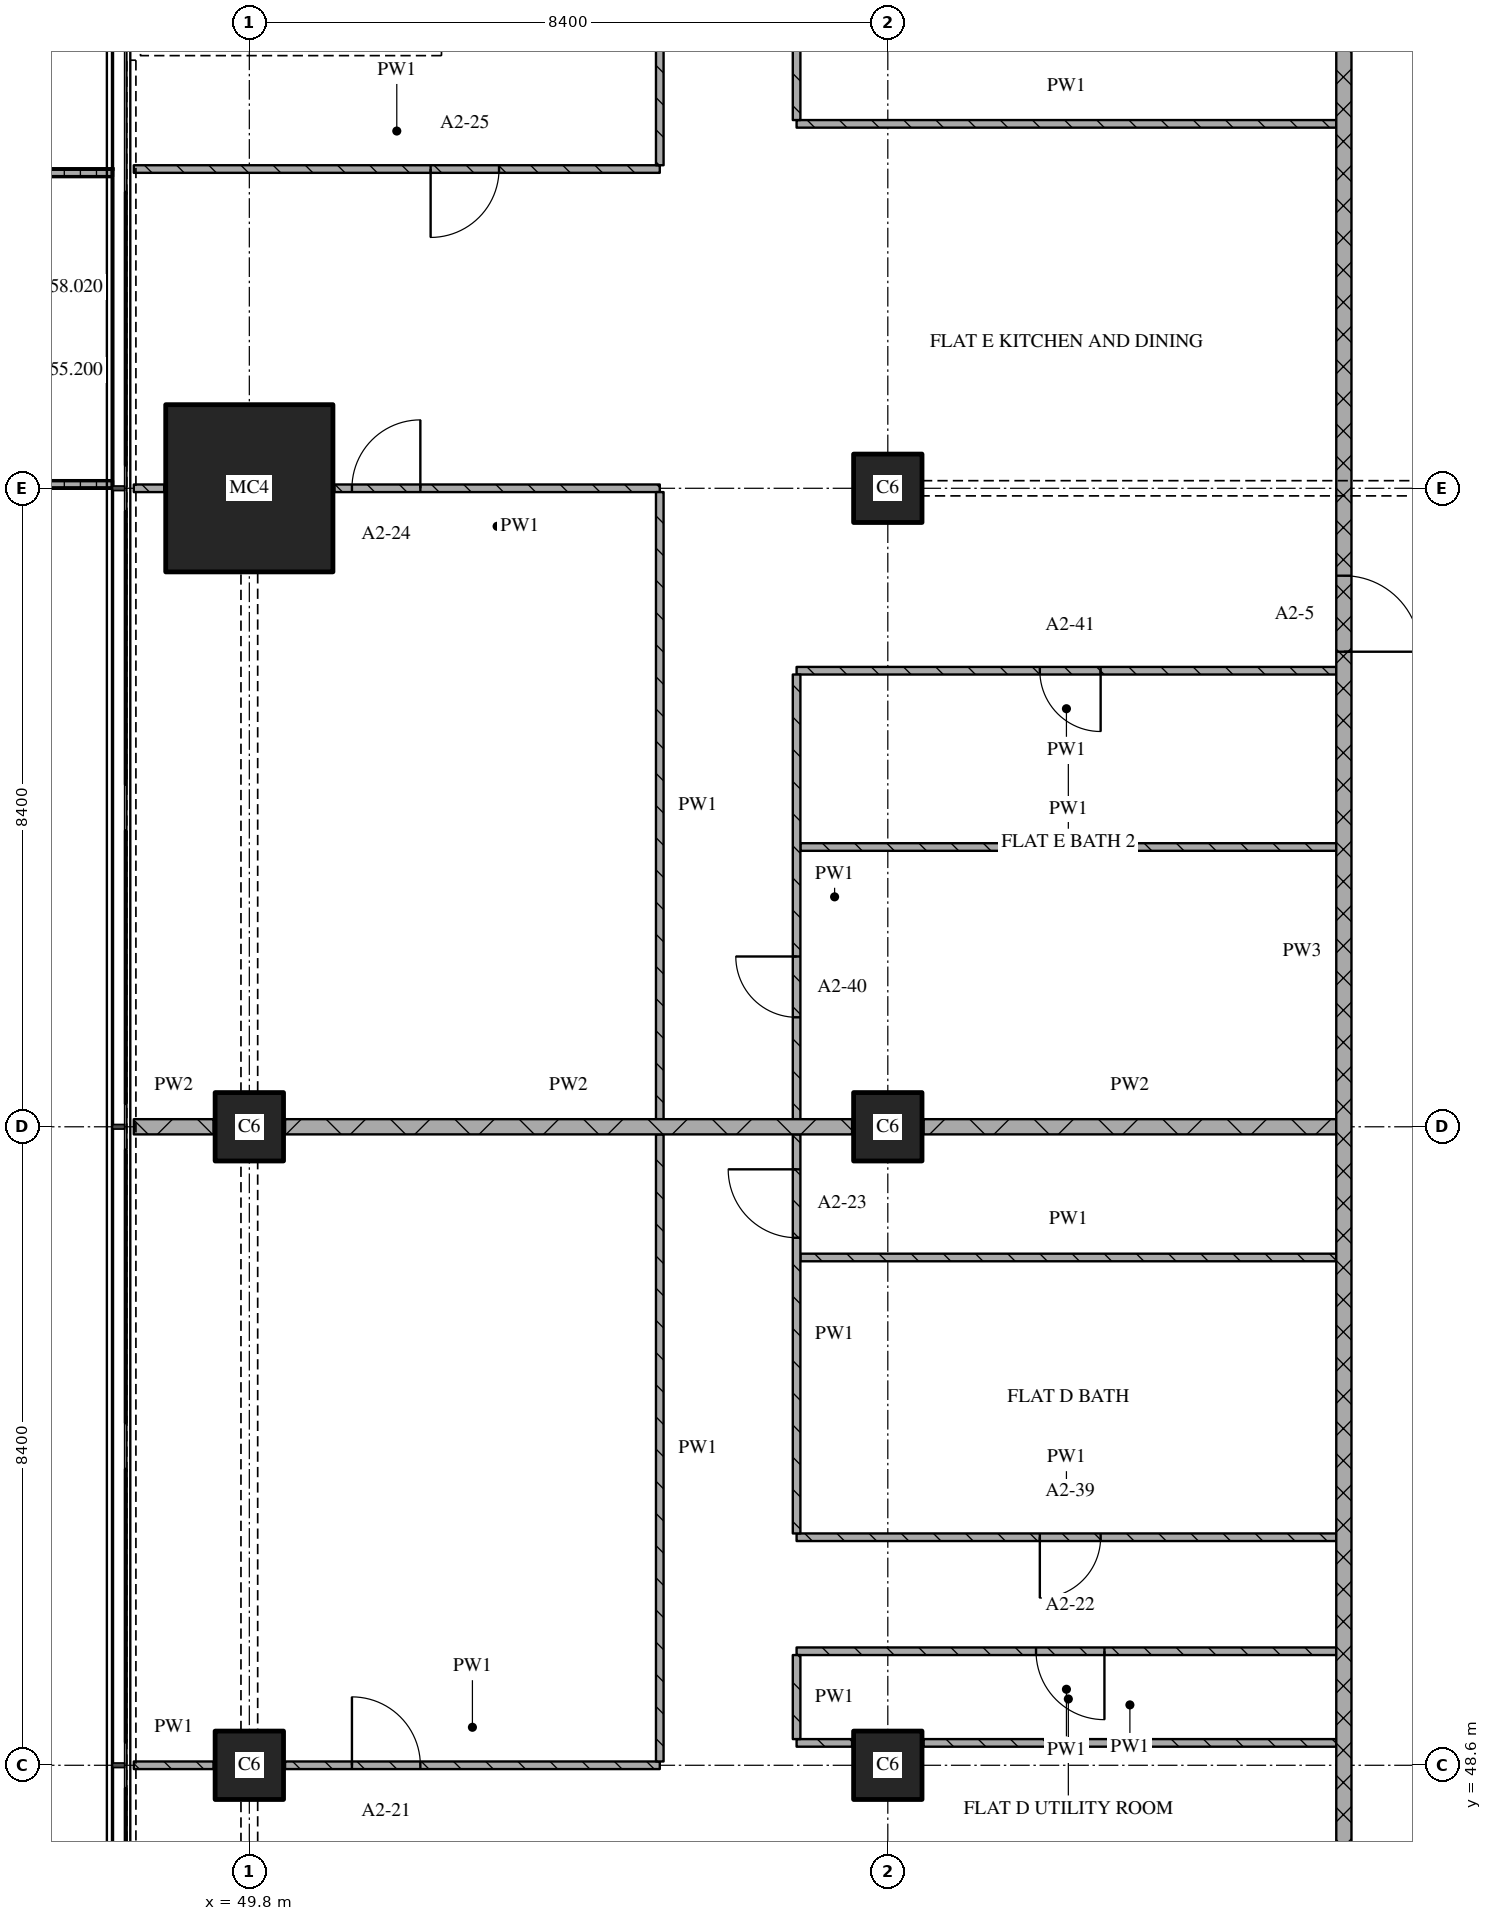
"""IFC4 building model, lengths in metres.
Left out: names, types, materials, properties, quantities, classifications, styles, units other than length and angle.
Written with IfcOpenShell. Run it as: python <this file> out.ifc"""

import sys

from ifc_helpers import new_model, si_unit, direction, frame, frame_2d, origin, origin_2d, place, context, subcontext, project, spatial, polyline, rectangle, outline, extrude, element, fill, save


model = new_model("IFC4")
c1 = context("Model", 3, precision=1e-05, world=origin(), true_north=direction((0.0, 1.0)))
c2 = subcontext(c1, "Body", "Model", "MODEL_VIEW")
j1 = project(units=[si_unit("LENGTHUNIT", "METRE"), si_unit("PLANEANGLEUNIT", "RADIAN")], contexts=[c1])
p1 = place(None, origin())
s1 = spatial("IfcSite", under=j1, at=p1, CompositionType="ELEMENT")
p2 = place(p1, origin())
s2 = spatial("IfcBuilding", under=s1, at=p2, CompositionType="ELEMENT")
p3 = place(p2, frame((0.0, 0.0, 55.2)))
s3 = spatial("IfcBuildingStorey", under=s2, at=p3, CompositionType="ELEMENT", Elevation=55.2)
for number, where, z_axis, x_axis in (
    (1, (49.8, 48.6, 0.0), (0.0, 0.0, 1.0), (1.0, 0.0, 0.0)),
    (2, (49.8, 57.0, 0.0), (0.0, 0.0, 1.0), (1.0, 0.0, 0.0)),
):
    element("IfcColumn", number, at=place(p3, frame(where, z_axis=z_axis, x_axis=x_axis)), inside=s3, PredefinedType="COLUMN", context=c2, shape_type="SweptSolid", body=[
        extrude(rectangle(XDim=0.9, YDim=0.9, at=origin_2d()), origin(), (0.0, 0.0, 1.0), 3.6),
    ])
p4 = place(p3, frame((49.8, 65.4, 0.0), z_axis=(0.0, 0.0, 1.0), x_axis=(1.0, 0.0, 0.0)))
e3 = element("IfcColumn", 3, at=p4, inside=s3, PredefinedType="COLUMN", context=c2, shape_type="SweptSolid", body=[
    extrude(rectangle(XDim=2.2, YDim=2.2, at=origin_2d()), origin(), (0.0, 0.0, 1.0), 3.6),
])
for number, where, z_axis, x_axis in (
    (4, (58.2, 48.6, 0.0), (0.0, 0.0, 1.0), (1.0, 0.0, 0.0)),
    (5, (58.2, 57.0, 0.0), (0.0, 0.0, 1.0), (1.0, 0.0, 0.0)),
    (6, (58.2, 65.4, 0.0), (0.0, 0.0, 1.0), (1.0, 0.0, 0.0)),
):
    element("IfcColumn", number, at=place(p3, frame(where, z_axis=z_axis, x_axis=x_axis)), inside=s3, PredefinedType="COLUMN", context=c2, shape_type="SweptSolid", body=[
        extrude(rectangle(XDim=0.9, YDim=0.9, at=origin_2d()), origin(), (0.0, 0.0, 1.0), 3.6),
    ])
p5 = place(p3, origin())
e7 = element("IfcWall", 7, at=p5, inside=s3, PredefinedType="SOLIDWALL", context=c2, shape_type="SweptSolid", body=[
    extrude(outline(polyline([(48.0, 69.6), (48.0, 69.5), (46.367, 69.5), (46.367, 65.5), (48.0, 65.5), (48.0, 65.4), (46.267, 65.4), (46.267, 69.6), (48.0, 69.6)])), origin(), (0.0, 0.0, 1.0), 1.0),
])
p6 = place(p3, frame((48.28, 48.6, 0.0), z_axis=(0.0, 0.0, 1.0), x_axis=(1.0, 0.0, 0.0)))
e8 = element("IfcWall", 8, at=p6, inside=s3, PredefinedType="PARTITIONING", context=c2, shape_type="SweptSolid", body=[
    extrude(rectangle(XDim=1.05, YDim=0.1, at=frame_2d((0.525, 0.0))), origin(), (0.0, 0.0, 1.0), 3.32),
])
p7 = place(p3, frame((50.27, 48.6, 0.0), z_axis=(0.0, 0.0, 1.0), x_axis=(1.0, 0.0, 0.0)))
e9 = element("IfcWall", 9, at=p7, inside=s3, PredefinedType="PARTITIONING", context=c2, shape_type="SweptSolid", body=[
    extrude(rectangle(XDim=4.93, YDim=0.1, at=frame_2d((2.465, 0.0))), origin(), (0.0, 0.0, 1.0), 3.32),
])
p8 = place(p7, frame((0.88, 0.0, 0.0)))
e10 = element("IfcOpeningElement", 10, at=p8, cuts=e9, PredefinedType="OPENING", context=c2, shape_type="SweptSolid", body=[
    extrude(rectangle(XDim=0.9, YDim=2.1, at=frame_2d((0.45, 1.05))), frame((0.0, 0.06, 0.0), z_axis=(0.0, -1.0, 0.0), x_axis=(1.0, 0.0, 0.0)), (0.0, 0.0, 1.0), 0.12),
])
p9 = place(p3, frame((57.0, 48.894, 0.0), z_axis=(0.0, 0.0, 1.0), x_axis=(1.0, 0.0, 0.0)))
e11 = element("IfcWall", 11, at=p9, inside=s3, PredefinedType="PARTITIONING", context=c2, shape_type="SweptSolid", body=[
    extrude(rectangle(XDim=0.73, YDim=0.1, at=frame_2d((0.365, 0.0))), origin(), (0.0, 0.0, 1.0), 3.32),
])
p10 = place(p3, frame((58.67, 48.894, 0.0), z_axis=(0.0, 0.0, 1.0), x_axis=(1.0, 0.0, 0.0)))
e12 = element("IfcWall", 12, at=p10, inside=s3, PredefinedType="PARTITIONING", context=c2, shape_type="SweptSolid", body=[
    extrude(rectangle(XDim=5.43, YDim=0.1, at=frame_2d((2.715, 0.0))), origin(), (0.0, 0.0, 1.0), 3.32),
])
p11 = place(p3, frame((64.1, 50.1, 0.0), z_axis=(0.0, 0.0, 1.0), x_axis=(-1.0, 0.0, 0.0)))
e13 = element("IfcWall", 13, at=p11, inside=s3, PredefinedType="PARTITIONING", context=c2, shape_type="SweptSolid", body=[
    extrude(rectangle(XDim=7.1, YDim=0.1, at=frame_2d((3.55, 0.0))), origin(), (0.0, 0.0, 1.0), 3.32),
])
p12 = place(p11, frame((3.05, 0.0, 0.0)))
e14 = element("IfcOpeningElement", 14, at=p12, cuts=e13, PredefinedType="OPENING", context=c2, shape_type="SweptSolid", body=[
    extrude(rectangle(XDim=0.9, YDim=2.1, at=frame_2d((0.45, 1.05))), frame((0.0, 0.06, 0.0), z_axis=(0.0, -1.0, 0.0), x_axis=(1.0, 0.0, 0.0)), (0.0, 0.0, 1.0), 0.12),
])
p13 = place(p3, frame((57.0, 51.6, 0.0), z_axis=(0.0, 0.0, 1.0), x_axis=(1.0, 0.0, 0.0)))
e15 = element("IfcWall", 15, at=p13, inside=s3, PredefinedType="PARTITIONING", context=c2, shape_type="SweptSolid", body=[
    extrude(rectangle(XDim=7.1, YDim=0.1, at=frame_2d((3.55, 0.0))), origin(), (0.0, 0.0, 1.0), 3.32),
])
p14 = place(p13, frame((3.2, 0.0, 0.0)))
e16 = element("IfcOpeningElement", 16, at=p14, cuts=e15, PredefinedType="OPENING", context=c2, shape_type="SweptSolid", body=[
    extrude(rectangle(XDim=0.8, YDim=2.1, at=frame_2d((0.4, 1.05))), frame((0.0, 0.06, 0.0), z_axis=(0.0, -1.0, 0.0), x_axis=(1.0, 0.0, 0.0)), (0.0, 0.0, 1.0), 0.12),
])
p15 = place(p3, frame((57.05, 55.281, 0.0), z_axis=(0.0, 0.0, 1.0), x_axis=(1.0, 0.0, 0.0)))
e17 = element("IfcWall", 17, at=p15, inside=s3, PredefinedType="PARTITIONING", context=c2, shape_type="SweptSolid", body=[
    extrude(rectangle(XDim=7.05, YDim=0.1, at=frame_2d((3.525, 0.0))), origin(), (0.0, 0.0, 1.0), 3.32),
])
p16 = place(p3, frame((48.28, 57.0, 0.0), z_axis=(0.0, 0.0, 1.0), x_axis=(1.0, 0.0, 0.0)))
e18 = element("IfcWall", 18, at=p16, inside=s3, PredefinedType="PARTITIONING", context=c2, shape_type="SweptSolid", body=[
    extrude(rectangle(XDim=1.05, YDim=0.2, at=frame_2d((0.525, 0.0))), origin(), (0.0, 0.0, 1.0), 3.32),
])
p17 = place(p3, frame((50.27, 57.0, 0.0), z_axis=(0.0, 0.0, 1.0), x_axis=(1.0, 0.0, 0.0)))
e19 = element("IfcWall", 19, at=p17, inside=s3, PredefinedType="PARTITIONING", context=c2, shape_type="SweptSolid", body=[
    extrude(rectangle(XDim=7.46, YDim=0.2, at=frame_2d((3.73, 0.0))), origin(), (0.0, 0.0, 1.0), 3.32),
])
p18 = place(p3, frame((58.67, 57.0, 0.0), z_axis=(0.0, 0.0, 1.0), x_axis=(1.0, 0.0, 0.0)))
e20 = element("IfcWall", 20, at=p18, inside=s3, PredefinedType="PARTITIONING", context=c2, shape_type="SweptSolid", body=[
    extrude(rectangle(XDim=5.43, YDim=0.2, at=frame_2d((2.715, 0.0))), origin(), (0.0, 0.0, 1.0), 3.32),
])
p19 = place(p3, frame((57.05, 60.681, 0.0), z_axis=(0.0, 0.0, 1.0), x_axis=(1.0, 0.0, 0.0)))
e21 = element("IfcWall", 21, at=p19, inside=s3, PredefinedType="PARTITIONING", context=c2, shape_type="SweptSolid", body=[
    extrude(rectangle(XDim=7.05, YDim=0.1, at=frame_2d((3.525, 0.0))), origin(), (0.0, 0.0, 1.0), 3.32),
])
p20 = place(p3, frame((64.1, 63.0, 0.0), z_axis=(0.0, 0.0, 1.0), x_axis=(-1.0, 0.0, 0.0)))
e22 = element("IfcWall", 22, at=p20, inside=s3, PredefinedType="PARTITIONING", context=c2, shape_type="SweptSolid", body=[
    extrude(rectangle(XDim=7.1, YDim=0.1, at=frame_2d((3.55, 0.0))), origin(), (0.0, 0.0, 1.0), 3.32),
])
p21 = place(p20, frame((3.1, 0.0, 0.0)))
e23 = element("IfcOpeningElement", 23, at=p21, cuts=e22, PredefinedType="OPENING", context=c2, shape_type="SweptSolid", body=[
    extrude(rectangle(XDim=0.8, YDim=2.1, at=frame_2d((0.4, 1.05))), frame((0.0, 0.06, 0.0), z_axis=(0.0, -1.0, 0.0), x_axis=(1.0, 0.0, 0.0)), (0.0, 0.0, 1.0), 0.12),
])
p22 = place(p3, frame((48.28, 65.4, 0.0), z_axis=(0.0, 0.0, 1.0), x_axis=(1.0, 0.0, 0.0)))
e24 = element("IfcWall", 24, at=p22, inside=s3, PredefinedType="PARTITIONING", context=c2, shape_type="SweptSolid", body=[
    extrude(rectangle(XDim=0.4, YDim=0.1, at=frame_2d((0.2, 0.0))), origin(), (0.0, 0.0, 1.0), 3.32),
])
p23 = place(p3, frame((55.2, 65.4, 0.0), z_axis=(0.0, 0.0, 1.0), x_axis=(-1.0, 0.0, 0.0)))
e25 = element("IfcWall", 25, at=p23, inside=s3, PredefinedType="PARTITIONING", context=c2, shape_type="SweptSolid", body=[
    extrude(rectangle(XDim=4.28, YDim=0.1, at=frame_2d((2.14, 0.0))), origin(), (0.0, 0.0, 1.0), 3.32),
])
p24 = place(p23, frame((3.15, 0.0, 0.0)))
e26 = element("IfcOpeningElement", 26, at=p24, cuts=e25, PredefinedType="OPENING", context=c2, shape_type="SweptSolid", body=[
    extrude(rectangle(XDim=0.9, YDim=2.1, at=frame_2d((0.45, 1.05))), frame((0.0, 0.06, 0.0), z_axis=(0.0, -1.0, 0.0), x_axis=(1.0, 0.0, 0.0)), (0.0, 0.0, 1.0), 0.12),
])
p25 = place(p3, frame((48.28, 69.6, 0.0), z_axis=(0.0, 0.0, 1.0), x_axis=(1.0, 0.0, 0.0)))
e27 = element("IfcWall", 27, at=p25, inside=s3, PredefinedType="PARTITIONING", context=c2, shape_type="SweptSolid", body=[
    extrude(rectangle(XDim=6.92, YDim=0.1, at=frame_2d((3.46, 0.0))), origin(), (0.0, 0.0, 1.0), 3.32),
])
p26 = place(p25, frame((3.905, 0.0, 0.0)))
e28 = element("IfcOpeningElement", 28, at=p26, cuts=e27, PredefinedType="OPENING", context=c2, shape_type="SweptSolid", body=[
    extrude(rectangle(XDim=0.9, YDim=2.1, at=frame_2d((0.45, 1.05))), frame((0.0, 0.06, 0.0), z_axis=(0.0, -1.0, 0.0), x_axis=(1.0, 0.0, 0.0)), (0.0, 0.0, 1.0), 0.12),
])
p27 = place(p3, frame((57.0, 70.194, 0.0), z_axis=(0.0, 0.0, 1.0), x_axis=(1.0, 0.0, 0.0)))
e29 = element("IfcWall", 29, at=p27, inside=s3, PredefinedType="PARTITIONING", context=c2, shape_type="SweptSolid", body=[
    extrude(rectangle(XDim=7.1, YDim=0.1, at=frame_2d((3.55, 0.0))), origin(), (0.0, 0.0, 1.0), 3.32),
])
p28 = place(p3, frame((55.2, 75.32, 0.0), z_axis=(0.0, 0.0, 1.0), x_axis=(0.0, -1.0, 0.0)))
e30 = element("IfcWall", 30, at=p28, inside=s3, PredefinedType="PARTITIONING", context=c2, shape_type="SweptSolid", body=[
    extrude(rectangle(XDim=5.67, YDim=0.1, at=frame_2d((2.835, 0.0))), origin(), (0.0, 0.0, 1.0), 3.32),
])
p29 = place(p3, frame((57.0, 50.05, 0.0), z_axis=(0.0, 0.0, 1.0), x_axis=(0.0, -1.0, 0.0)))
e31 = element("IfcWall", 31, at=p29, inside=s3, PredefinedType="PARTITIONING", context=c2, shape_type="SweptSolid", body=[
    extrude(rectangle(XDim=1.106, YDim=0.1, at=frame_2d((0.553, 0.0))), origin(), (0.0, 0.0, 1.0), 3.32),
])
p30 = place(p3, frame((57.0, 75.32, 0.0), z_axis=(0.0, 0.0, 1.0), x_axis=(0.0, -1.0, 0.0)))
e32 = element("IfcWall", 32, at=p30, inside=s3, PredefinedType="PARTITIONING", context=c2, shape_type="SweptSolid", body=[
    extrude(rectangle(XDim=5.076, YDim=0.1, at=frame_2d((2.538, 0.0))), origin(), (0.0, 0.0, 1.0), 3.32),
])
p31 = place(p30, frame((2.723, 0.0, 0.0)))
e33 = element("IfcOpeningElement", 33, at=p31, cuts=e32, PredefinedType="OPENING", context=c2, shape_type="SweptSolid", body=[
    extrude(rectangle(XDim=0.9, YDim=2.1, at=frame_2d((0.45, 1.05))), frame((0.0, 0.06, 0.0), z_axis=(0.0, -1.0, 0.0), x_axis=(1.0, 0.0, 0.0)), (0.0, 0.0, 1.0), 0.12),
])
p32 = place(p3, frame((64.2, 43.3, 0.0), z_axis=(0.0, 0.0, 1.0), x_axis=(0.0, 1.0, 0.0)))
e34 = element("IfcWall", 34, at=p32, inside=s3, PredefinedType="PARTITIONING", context=c2, shape_type="SweptSolid", body=[
    extrude(rectangle(XDim=32.02, YDim=0.2, at=frame_2d((16.01, 0.0))), origin(), (0.0, 0.0, 1.0), 3.32),
])
p33 = place(p32, frame((19.95, 0.0, 0.0)))
e35 = element("IfcOpeningElement", 35, at=p33, cuts=e34, PredefinedType="OPENING", context=c2, shape_type="SweptSolid", body=[
    extrude(rectangle(XDim=1.0, YDim=2.1, at=frame_2d((0.5, 1.05))), frame((0.0, 0.11, 0.0), z_axis=(0.0, -1.0, 0.0), x_axis=(1.0, 0.0, 0.0)), (0.0, 0.0, 1.0), 0.22),
])
for number, where, z_axis, x_axis in (
    (36, (55.2, 56.9, 0.0), (0.0, 0.0, 1.0), (0.0, -1.0, 0.0)),
    (37, (55.2, 65.35, 0.0), (0.0, 0.0, 1.0), (0.0, -1.0, 0.0)),
):
    element("IfcWall", number, at=place(p3, frame(where, z_axis=z_axis, x_axis=x_axis)), inside=s3, PredefinedType="PARTITIONING", context=c2, shape_type="SweptSolid", body=[
        extrude(rectangle(XDim=8.25, YDim=0.1, at=frame_2d((4.125, 0.0))), origin(), (0.0, 0.0, 1.0), 3.32),
    ])
p34 = place(p3, frame((57.0, 56.9, 0.0), z_axis=(0.0, 0.0, 1.0), x_axis=(0.0, -1.0, 0.0)))
e38 = element("IfcWall", 38, at=p34, inside=s3, PredefinedType="PARTITIONING", context=c2, shape_type="SweptSolid", body=[
    extrude(rectangle(XDim=5.25, YDim=0.1, at=frame_2d((2.625, 0.0))), origin(), (0.0, 0.0, 1.0), 3.32),
])
p35 = place(p34, frame((0.46, 0.0, 0.0)))
e39 = element("IfcOpeningElement", 39, at=p35, cuts=e38, PredefinedType="OPENING", context=c2, shape_type="SweptSolid", body=[
    extrude(rectangle(XDim=0.9, YDim=2.1, at=frame_2d((0.45, 1.05))), frame((0.0, 0.06, 0.0), z_axis=(0.0, -1.0, 0.0), x_axis=(1.0, 0.0, 0.0)), (0.0, 0.0, 1.0), 0.12),
])
p36 = place(p3, frame((57.0, 62.95, 0.0), z_axis=(0.0, 0.0, 1.0), x_axis=(0.0, -1.0, 0.0)))
e40 = element("IfcWall", 40, at=p36, inside=s3, PredefinedType="PARTITIONING", context=c2, shape_type="SweptSolid", body=[
    extrude(rectangle(XDim=5.85, YDim=0.1, at=frame_2d((2.925, 0.0))), origin(), (0.0, 0.0, 1.0), 3.32),
])
p37 = place(p36, frame((3.71, 0.0, 0.0)))
e41 = element("IfcOpeningElement", 41, at=p37, cuts=e40, PredefinedType="OPENING", context=c2, shape_type="SweptSolid", body=[
    extrude(rectangle(XDim=0.8, YDim=2.1, at=frame_2d((0.4, 1.05))), frame((0.0, 0.06, 0.0), z_axis=(0.0, -1.0, 0.0), x_axis=(1.0, 0.0, 0.0)), (0.0, 0.0, 1.0), 0.12),
])
p38 = place(p8, origin())
e42 = element("IfcDoor", 42, at=p38, inside=s3, OperationType="SINGLE_SWING_LEFT", PredefinedType="DOOR", context=c2, shape_type="SweptSolid", body=[
    extrude(rectangle(XDim=0.9, YDim=2.1, at=frame_2d((0.45, 1.05))), frame((0.0, 0.025, 0.0), z_axis=(0.0, -1.0, 0.0), x_axis=(1.0, 0.0, 0.0)), (0.0, 0.0, 1.0), 0.05),
])
fill(e10, e42)
p39 = place(p12, origin())
e43 = element("IfcDoor", 43, at=p39, inside=s3, OperationType="SINGLE_SWING_LEFT", PredefinedType="DOOR", context=c2, shape_type="SweptSolid", body=[
    extrude(rectangle(XDim=0.9, YDim=2.1, at=frame_2d((0.45, 1.05))), frame((0.0, 0.025, 0.0), z_axis=(0.0, -1.0, 0.0), x_axis=(1.0, 0.0, 0.0)), (0.0, 0.0, 1.0), 0.05),
])
fill(e14, e43)
p40 = place(p14, origin())
e44 = element("IfcDoor", 44, at=p40, inside=s3, OperationType="SINGLE_SWING_RIGHT", PredefinedType="DOOR", context=c2, shape_type="SweptSolid", body=[
    extrude(rectangle(XDim=0.8, YDim=2.1, at=frame_2d((0.4, 1.05))), frame((0.0, 0.025, 0.0), z_axis=(0.0, -1.0, 0.0), x_axis=(1.0, 0.0, 0.0)), (0.0, 0.0, 1.0), 0.05),
])
fill(e16, e44)
p41 = place(p21, origin())
e45 = element("IfcDoor", 45, at=p41, inside=s3, OperationType="SINGLE_SWING_LEFT", PredefinedType="DOOR", context=c2, shape_type="SweptSolid", body=[
    extrude(rectangle(XDim=0.8, YDim=2.1, at=frame_2d((0.4, 1.05))), frame((0.0, 0.025, 0.0), z_axis=(0.0, -1.0, 0.0), x_axis=(1.0, 0.0, 0.0)), (0.0, 0.0, 1.0), 0.05),
])
fill(e23, e45)
p42 = place(p24, origin())
e46 = element("IfcDoor", 46, at=p42, inside=s3, OperationType="SINGLE_SWING_RIGHT", PredefinedType="DOOR", context=c2, shape_type="SweptSolid", body=[
    extrude(rectangle(XDim=0.9, YDim=2.1, at=frame_2d((0.45, 1.05))), frame((0.0, 0.025, 0.0), z_axis=(0.0, -1.0, 0.0), x_axis=(1.0, 0.0, 0.0)), (0.0, 0.0, 1.0), 0.05),
])
fill(e26, e46)
p43 = place(p26, origin())
e47 = element("IfcDoor", 47, at=p43, inside=s3, OperationType="SINGLE_SWING_RIGHT", PredefinedType="DOOR", context=c2, shape_type="SweptSolid", body=[
    extrude(rectangle(XDim=0.9, YDim=2.1, at=frame_2d((0.45, 1.05))), frame((0.0, 0.025, 0.0), z_axis=(0.0, -1.0, 0.0), x_axis=(1.0, 0.0, 0.0)), (0.0, 0.0, 1.0), 0.05),
])
fill(e28, e47)
p44 = place(p33, origin())
e48 = element("IfcDoor", 48, at=p44, inside=s3, OperationType="SINGLE_SWING_RIGHT", PredefinedType="DOOR", context=c2, shape_type="SweptSolid", body=[
    extrude(rectangle(XDim=1.0, YDim=2.1, at=frame_2d((0.5, 1.05))), frame((0.0, 0.025, 0.0), z_axis=(0.0, -1.0, 0.0), x_axis=(1.0, 0.0, 0.0)), (0.0, 0.0, 1.0), 0.05),
])
fill(e35, e48)
p45 = place(p35, origin())
e49 = element("IfcDoor", 49, at=p45, inside=s3, OperationType="SINGLE_SWING_RIGHT", PredefinedType="DOOR", context=c2, shape_type="SweptSolid", body=[
    extrude(rectangle(XDim=0.9, YDim=2.1, at=frame_2d((0.45, 1.05))), frame((0.0, 0.025, 0.0), z_axis=(0.0, -1.0, 0.0), x_axis=(1.0, 0.0, 0.0)), (0.0, 0.0, 1.0), 0.05),
])
fill(e39, e49)
p46 = place(p37, origin())
e50 = element("IfcDoor", 50, at=p46, inside=s3, OperationType="SINGLE_SWING_RIGHT", PredefinedType="DOOR", context=c2, shape_type="SweptSolid", body=[
    extrude(rectangle(XDim=0.8, YDim=2.1, at=frame_2d((0.4, 1.05))), frame((0.0, 0.025, 0.0), z_axis=(0.0, -1.0, 0.0), x_axis=(1.0, 0.0, 0.0)), (0.0, 0.0, 1.0), 0.05),
])
fill(e41, e50)
save(model, sys.argv[1])
